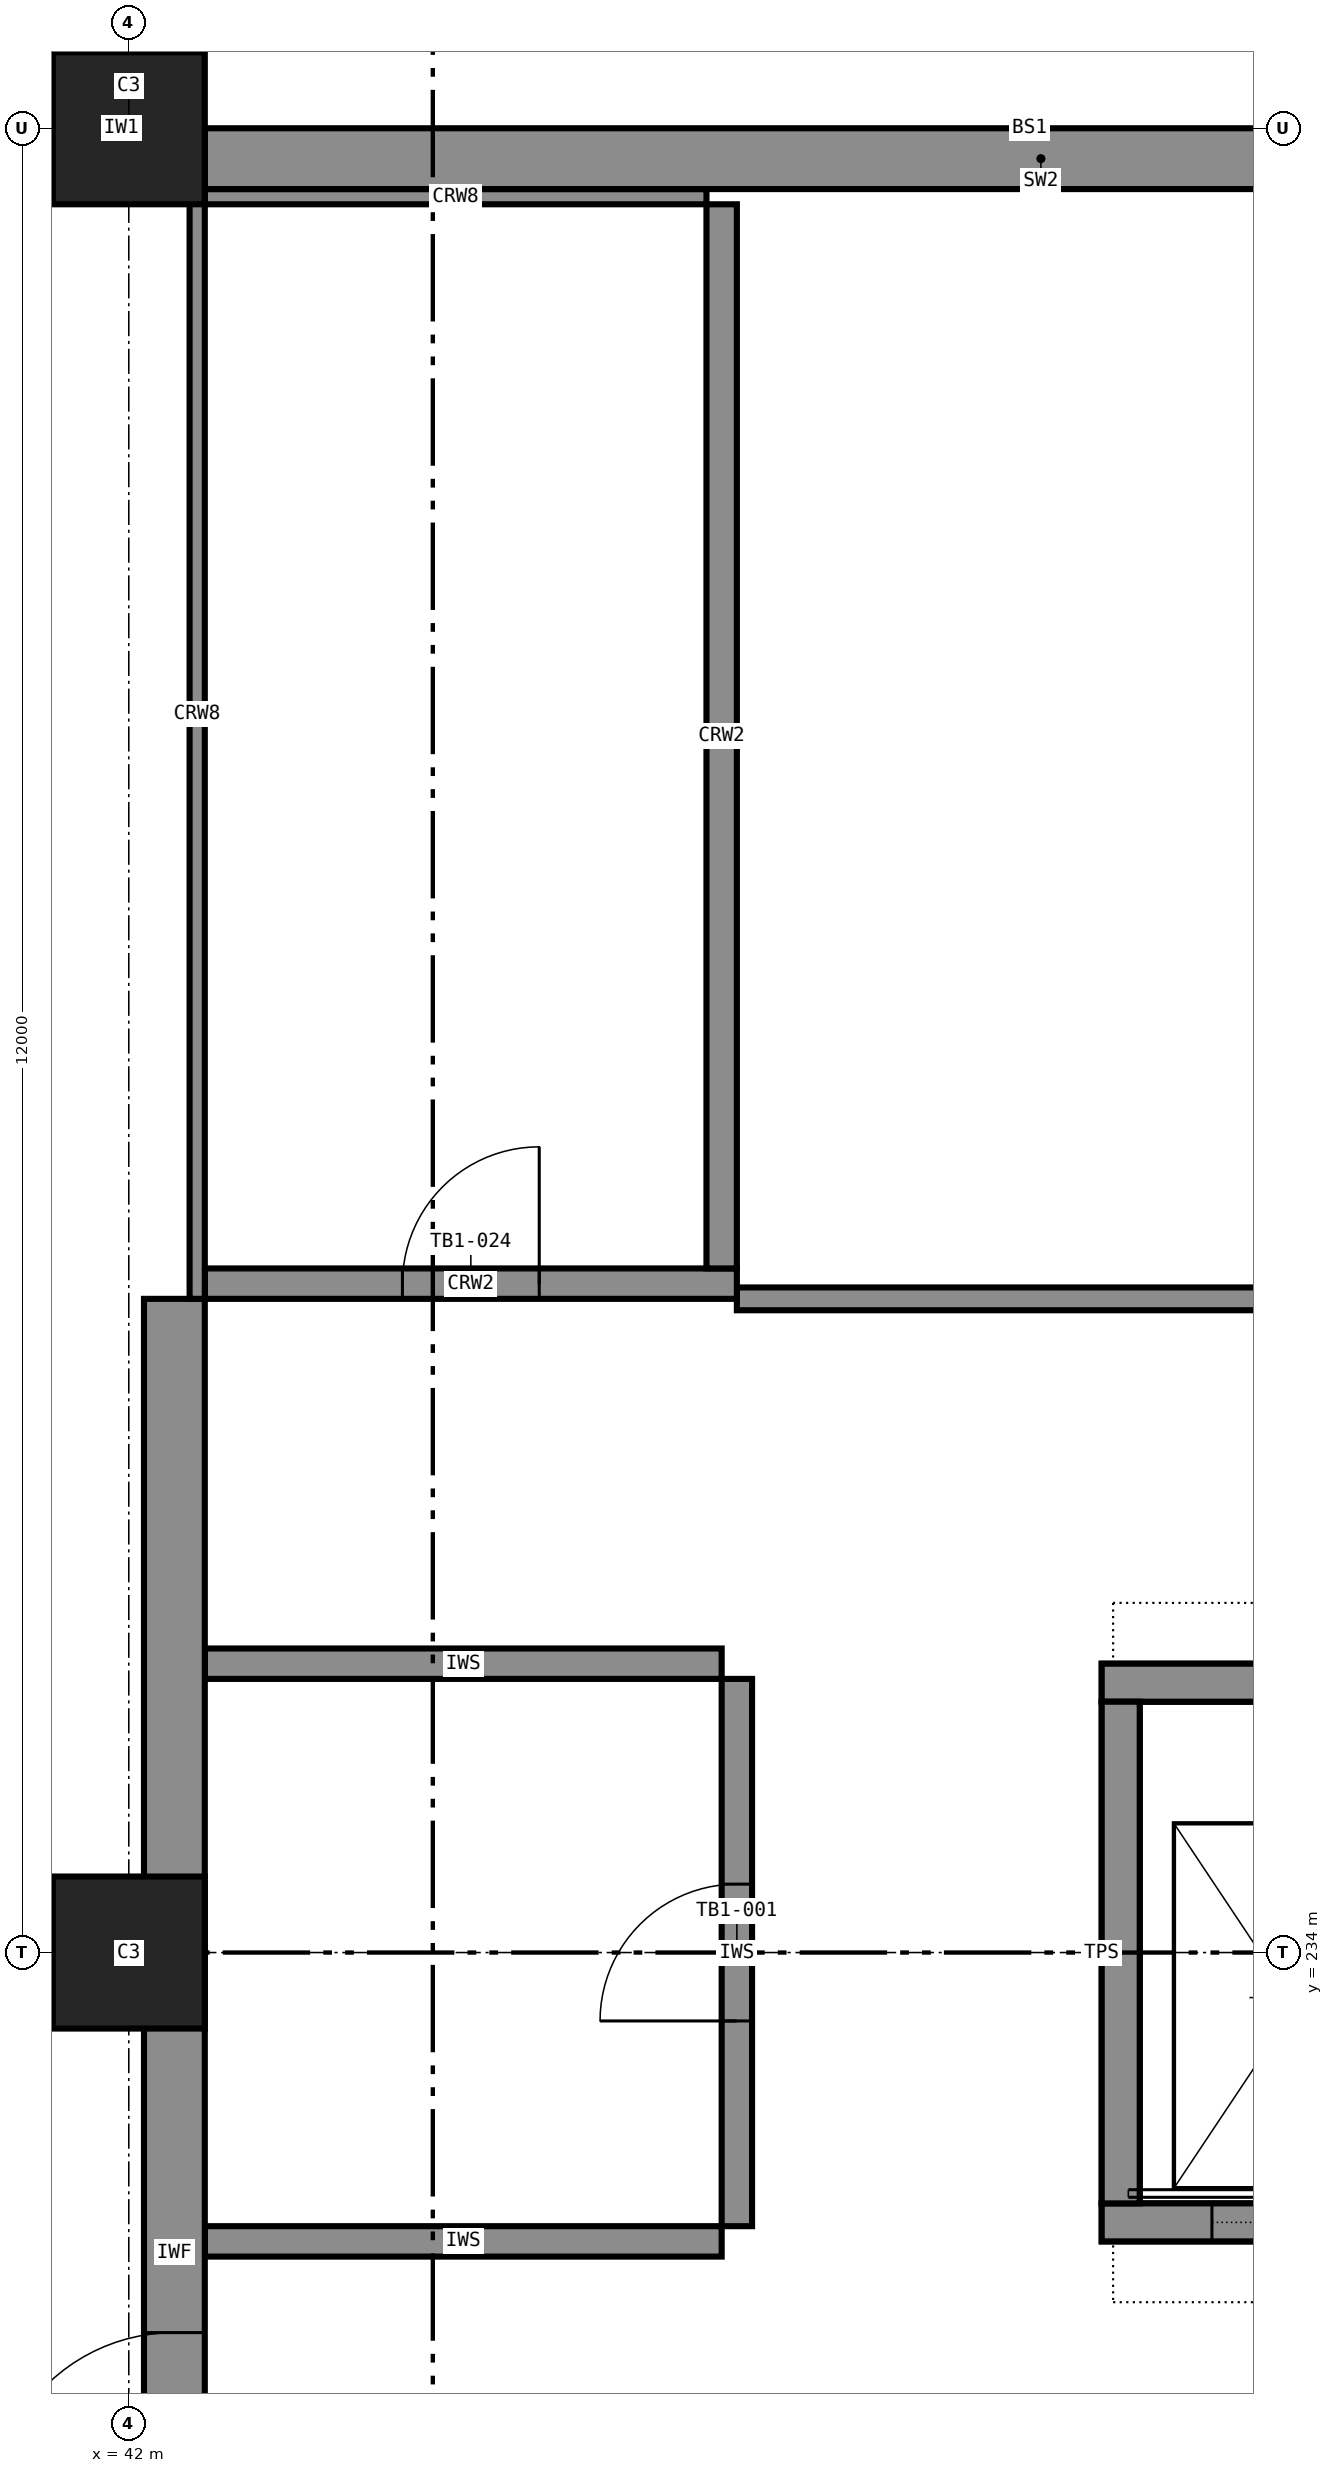
"""IFC4 building model, lengths in metres.
Left out: names, types, materials, properties, quantities, classifications, styles, units other than length and angle.
Written with IfcOpenShell. Run it as: python <this file> out.ifc"""

import sys

from ifc_helpers import new_model, si_unit, direction, frame, frame_2d, origin, origin_2d, place, context, subcontext, project, spatial, rectangle, extrude, element, fill, save


model = new_model("IFC4")
c1 = context("Model", 3, precision=1e-05, world=origin(), true_north=direction((0.0, 1.0)))
c2 = subcontext(c1, "Body", "Model", "MODEL_VIEW")
j1 = project(units=[si_unit("LENGTHUNIT", "METRE"), si_unit("PLANEANGLEUNIT", "RADIAN")], contexts=[c1])
p1 = place(None, origin())
s1 = spatial("IfcSite", under=j1, at=p1, CompositionType="ELEMENT")
p2 = place(p1, origin())
s2 = spatial("IfcBuilding", under=s1, at=p2, CompositionType="ELEMENT")
p3 = place(p2, frame((0.0, 0.0, -6.0)))
s3 = spatial("IfcBuildingStorey", under=s2, at=p3, CompositionType="ELEMENT", Elevation=-6.0)
for number, where, z_axis, x_axis in (
    (1, (42.0, 234.0, -0.4), (0.0, 0.0, 1.0), (1.0, 0.0, 0.0)),
    (2, (42.0, 246.0, -0.4), (0.0, 0.0, 1.0), (1.0, 0.0, 0.0)),
):
    element("IfcColumn", number, at=place(p3, frame(where, z_axis=z_axis, x_axis=x_axis)), inside=s3, PredefinedType="COLUMN", context=c2, shape_type="SweptSolid", body=[
        extrude(rectangle(XDim=1.0, YDim=1.0, at=origin_2d()), origin(), (0.0, 0.0, 1.0), 6.4),
    ])
p4 = place(p3, frame((48.4, 232.225, 0.0), z_axis=(0.0, 0.0, 1.0), x_axis=(1.0, 0.0, 0.0)))
e3 = element("IfcWall", 3, at=p4, inside=s3, PredefinedType="SHEAR", context=c2, shape_type="SweptSolid", body=[
    extrude(rectangle(XDim=2.55, YDim=0.25, at=frame_2d((1.275, 0.0))), origin(), (0.0, 0.0, 1.0), 6.0),
])
p5 = place(p4, frame((0.725, 0.0, 0.0)))
e4 = element("IfcOpeningElement", 4, at=p5, cuts=e3, PredefinedType="OPENING", context=c2, shape_type="SweptSolid", body=[
    extrude(rectangle(XDim=1.1, YDim=2.1, at=frame_2d((0.55, 1.05))), frame((0.0, 0.135, 0.0), z_axis=(0.0, -1.0, 0.0), x_axis=(1.0, 0.0, 0.0)), (0.0, 0.0, 1.0), 0.27),
])
p6 = place(p3, frame((48.4, 235.775, 0.0), z_axis=(0.0, 0.0, 1.0), x_axis=(1.0, 0.0, 0.0)))
e5 = element("IfcWall", 5, at=p6, inside=s3, PredefinedType="SHEAR", context=c2, shape_type="SweptSolid", body=[
    extrude(rectangle(XDim=2.55, YDim=0.25, at=frame_2d((1.275, 0.0))), origin(), (0.0, 0.0, 1.0), 6.0),
])
p7 = place(p3, frame((48.525, 232.35, 0.0), z_axis=(0.0, 0.0, 1.0), x_axis=(0.0, 1.0, 0.0)))
e6 = element("IfcWall", 6, at=p7, inside=s3, PredefinedType="SHEAR", context=c2, shape_type="SweptSolid", body=[
    extrude(rectangle(XDim=3.3, YDim=0.25, at=frame_2d((1.65, 0.0))), origin(), (0.0, 0.0, 1.0), 6.0),
])
p8 = place(p3, frame((42.5, 238.4, 0.0), z_axis=(0.0, 0.0, 1.0), x_axis=(1.0, 0.0, 0.0)))
e7 = element("IfcWall", 7, at=p8, inside=s3, PredefinedType="SHEAR", context=c2, shape_type="SweptSolid", body=[
    extrude(rectangle(XDim=3.5, YDim=0.2, at=frame_2d((1.75, 0.0))), origin(), (0.0, 0.0, 1.0), 5.7),
])
p9 = place(p8, frame((1.3, 0.0, 0.0)))
e8 = element("IfcOpeningElement", 8, at=p9, cuts=e7, PredefinedType="OPENING", context=c2, shape_type="SweptSolid", body=[
    extrude(rectangle(XDim=0.9, YDim=2.1, at=frame_2d((0.45, 1.05))), frame((0.0, 0.11, 0.0), z_axis=(0.0, -1.0, 0.0), x_axis=(1.0, 0.0, 0.0)), (0.0, 0.0, 1.0), 0.22),
])
p10 = place(p3, frame((45.9, 238.5, 0.0), z_axis=(0.0, 0.0, 1.0), x_axis=(0.0, 1.0, 0.0)))
e9 = element("IfcWall", 9, at=p10, inside=s3, PredefinedType="SHEAR", context=c2, shape_type="SweptSolid", body=[
    extrude(rectangle(XDim=7.0, YDim=0.2, at=frame_2d((3.5, 0.0))), origin(), (0.0, 0.0, 1.0), 5.7),
])
p11 = place(p3, frame((42.45, 238.3, 0.0), z_axis=(0.0, 0.0, 1.0), x_axis=(0.0, 1.0, 0.0)))
e10 = element("IfcWall", 10, at=p11, inside=s3, PredefinedType="SHEAR", context=c2, shape_type="SweptSolid", body=[
    extrude(rectangle(XDim=7.7, YDim=0.1, at=frame_2d((3.85, 0.0))), origin(), (0.0, 0.0, 1.0), 5.7),
])
p12 = place(p3, frame((42.5, 245.55, 0.0), z_axis=(0.0, 0.0, 1.0), x_axis=(1.0, 0.0, 0.0)))
e11 = element("IfcWall", 11, at=p12, inside=s3, PredefinedType="SHEAR", context=c2, shape_type="SweptSolid", body=[
    extrude(rectangle(XDim=3.3, YDim=0.1, at=frame_2d((1.65, 0.0))), origin(), (0.0, 0.0, 1.0), 5.7),
])
p13 = place(p3, frame((42.5, 245.8, 0.0), z_axis=(0.0, 0.0, 1.0), x_axis=(1.0, 0.0, 0.0)))
e12 = element("IfcWall", 12, at=p13, inside=s3, PredefinedType="SOLIDWALL", context=c2, shape_type="SweptSolid", body=[
    extrude(rectangle(XDim=11.0, YDim=0.4, at=frame_2d((5.5, 0.0))), origin(), (0.0, 0.0, 1.0), 5.7),
])
p14 = place(p3, frame((41.5, 246.0, 0.0), z_axis=(0.0, 0.0, 1.0), x_axis=(1.0, 0.0, 0.0)))
e13 = element("IfcWall", 13, at=p14, inside=s3, PredefinedType="PARTITIONING", context=c2, shape_type="SweptSolid", body=[
    extrude(rectangle(XDim=0.9, YDim=0.15, at=frame_2d((0.45, 0.0))), origin(), (0.0, 0.0, 1.0), 5.7),
])
for number, where, z_axis, x_axis in (
    (14, (42.5, 232.1, 0.0), (0.0, 0.0, 1.0), (1.0, 0.0, 0.0)),
    (15, (42.5, 235.9, 0.0), (0.0, 0.0, 1.0), (1.0, 0.0, 0.0)),
):
    element("IfcWall", number, at=place(p3, frame(where, z_axis=z_axis, x_axis=x_axis)), inside=s3, PredefinedType="PARTITIONING", context=c2, shape_type="SweptSolid", body=[
        extrude(rectangle(XDim=3.4, YDim=0.2, at=frame_2d((1.7, 0.0))), origin(), (0.0, 0.0, 1.0), 5.7),
    ])
p15 = place(p3, frame((46.0, 232.2, 0.0), z_axis=(0.0, 0.0, 1.0), x_axis=(0.0, 1.0, 0.0)))
e16 = element("IfcWall", 16, at=p15, inside=s3, PredefinedType="PARTITIONING", context=c2, shape_type="SweptSolid", body=[
    extrude(rectangle(XDim=3.6, YDim=0.2, at=frame_2d((1.8, 0.0))), origin(), (0.0, 0.0, 1.0), 5.7),
])
p16 = place(p15, frame((1.35, 0.0, 0.0)))
e17 = element("IfcOpeningElement", 17, at=p16, cuts=e16, PredefinedType="OPENING", context=c2, shape_type="SweptSolid", body=[
    extrude(rectangle(XDim=0.9, YDim=2.1, at=frame_2d((0.45, 1.05))), frame((0.0, 0.11, 0.0), z_axis=(0.0, -1.0, 0.0), x_axis=(1.0, 0.0, 0.0)), (0.0, 0.0, 1.0), 0.22),
])
p17 = place(p3, frame((42.3, 222.5, 0.0), z_axis=(0.0, 0.0, 1.0), x_axis=(0.0, 1.0, 0.0)))
e18 = element("IfcWall", 18, at=p17, inside=s3, PredefinedType="PARTITIONING", context=c2, shape_type="SweptSolid", body=[
    extrude(rectangle(XDim=15.8, YDim=0.4, at=frame_2d((7.9, 0.0))), origin(), (0.0, 0.0, 1.0), 5.7),
])
p18 = place(p17, frame((7.8, 0.0, 0.0)))
e19 = element("IfcOpeningElement", 19, at=p18, cuts=e18, PredefinedType="OPENING", context=c2, shape_type="SweptSolid", body=[
    extrude(rectangle(XDim=1.2, YDim=2.1, at=frame_2d((0.6, 1.05))), frame((0.0, 0.21, 0.0), z_axis=(0.0, -1.0, 0.0), x_axis=(1.0, 0.0, 0.0)), (0.0, 0.0, 1.0), 0.42),
])
p19 = place(p3, frame((46.0, 238.3, 0.0), z_axis=(0.0, 0.0, 1.0), x_axis=(1.0, 0.0, 0.0)))
e20 = element("IfcWall", 20, at=p19, inside=s3, PredefinedType="PARTITIONING", context=c2, shape_type="SweptSolid", body=[
    extrude(rectangle(XDim=12.1, YDim=0.15, at=frame_2d((6.05, 0.0))), origin(), (0.0, 0.0, 1.0), 5.7),
])
p20 = place(p19, frame((5.5, 0.0, 0.0)))
e21 = element("IfcOpeningElement", 21, at=p20, cuts=e20, PredefinedType="OPENING", context=c2, shape_type="SweptSolid", body=[
    extrude(rectangle(XDim=1.0, YDim=2.1, at=frame_2d((0.5, 1.05))), frame((0.0, 0.085, 0.0), z_axis=(0.0, -1.0, 0.0), x_axis=(1.0, 0.0, 0.0)), (0.0, 0.0, 1.0), 0.17),
])
for number, where, z_axis, x_axis in (
    (22, (48.4, 232.225, -1.6), (0.0, 0.0, 1.0), (1.0, 0.0, 0.0)),
    (23, (48.4, 235.775, -1.6), (0.0, 0.0, 1.0), (1.0, 0.0, 0.0)),
):
    element("IfcWall", number, at=place(p3, frame(where, z_axis=z_axis, x_axis=x_axis)), inside=s3, PredefinedType="SOLIDWALL", context=c2, shape_type="SweptSolid", body=[
        extrude(rectangle(XDim=2.55, YDim=0.25, at=frame_2d((1.275, 0.0))), origin(), (0.0, 0.0, 1.0), 1.6),
    ])
p21 = place(p3, frame((48.525, 232.35, -1.6), z_axis=(0.0, 0.0, 1.0), x_axis=(0.0, 1.0, 0.0)))
e24 = element("IfcWall", 24, at=p21, inside=s3, PredefinedType="SOLIDWALL", context=c2, shape_type="SweptSolid", body=[
    extrude(rectangle(XDim=3.3, YDim=0.25, at=frame_2d((1.65, 0.0))), origin(), (0.0, 0.0, 1.0), 1.6),
])
p22 = place(p16, origin())
e25 = element("IfcDoor", 25, at=p22, inside=s3, OperationType="SINGLE_SWING_LEFT", PredefinedType="DOOR", context=c2, shape_type="SweptSolid", body=[
    extrude(rectangle(XDim=0.9, YDim=2.1, at=frame_2d((0.45, 1.05))), frame((0.0, 0.025, 0.0), z_axis=(0.0, -1.0, 0.0), x_axis=(1.0, 0.0, 0.0)), (0.0, 0.0, 1.0), 0.05),
])
fill(e17, e25)
p23 = place(p18, origin())
e26 = element("IfcDoor", 26, at=p23, inside=s3, OperationType="SINGLE_SWING_LEFT", PredefinedType="DOOR", context=c2, shape_type="SweptSolid", body=[
    extrude(rectangle(XDim=1.2, YDim=2.1, at=frame_2d((0.6, 1.05))), frame((0.0, 0.025, 0.0), z_axis=(0.0, -1.0, 0.0), x_axis=(1.0, 0.0, 0.0)), (0.0, 0.0, 1.0), 0.05),
])
fill(e19, e26)
p24 = place(p5, origin())
e27 = element("IfcDoor", 27, at=p24, inside=s3, OperationType="SLIDING_TO_LEFT", PredefinedType="DOOR", context=c2, shape_type="SweptSolid", body=[
    extrude(rectangle(XDim=1.1, YDim=2.1, at=frame_2d((0.55, 1.05))), frame((0.0, 0.025, 0.0), z_axis=(0.0, -1.0, 0.0), x_axis=(1.0, 0.0, 0.0)), (0.0, 0.0, 1.0), 0.05),
])
fill(e4, e27)
p25 = place(p9, origin())
e28 = element("IfcDoor", 28, at=p25, inside=s3, OperationType="SINGLE_SWING_RIGHT", PredefinedType="DOOR", context=c2, shape_type="SweptSolid", body=[
    extrude(rectangle(XDim=0.9, YDim=2.1, at=frame_2d((0.45, 1.05))), frame((0.0, 0.025, 0.0), z_axis=(0.0, -1.0, 0.0), x_axis=(1.0, 0.0, 0.0)), (0.0, 0.0, 1.0), 0.05),
])
fill(e8, e28)
save(model, sys.argv[1])
